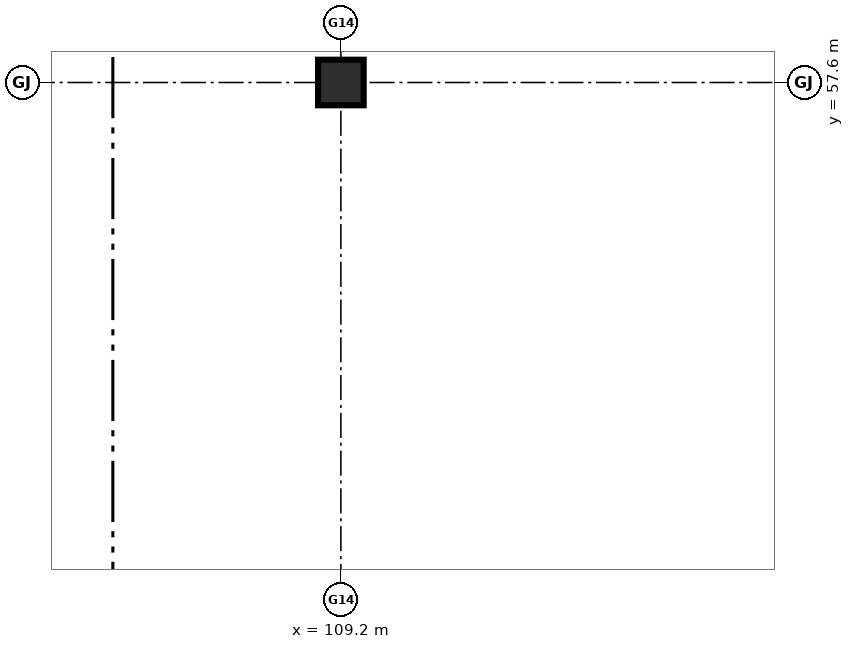
"""IFC4 building model, lengths in metres.
Left out: names, types, materials, properties, quantities, classifications, styles, units other than length and angle.
Written with IfcOpenShell. Run it as: python <this file> out.ifc"""

import sys

from ifc_helpers import new_model, si_unit, direction, frame, origin, origin_2d, place, context, subcontext, project, spatial, rectangle, extrude, element, save


model = new_model("IFC4")
c1 = context("Model", 3, precision=1e-05, world=origin(), true_north=direction((0.0, 1.0)))
c2 = subcontext(c1, "Body", "Model", "MODEL_VIEW")
j1 = project(units=[si_unit("LENGTHUNIT", "METRE"), si_unit("PLANEANGLEUNIT", "RADIAN")], contexts=[c1])
p1 = place(None, origin())
s1 = spatial("IfcSite", under=j1, at=p1, CompositionType="ELEMENT")
p2 = place(p1, origin())
s2 = spatial("IfcBuilding", under=s1, at=p2, CompositionType="ELEMENT")
p3 = place(p2, frame((0.0, 0.0, -4.8)))
s3 = spatial("IfcBuildingStorey", under=s2, at=p3, CompositionType="ELEMENT", Elevation=-4.8)
p4 = place(p3, frame((109.2, 57.6, 0.0), z_axis=(0.0, 0.0, 1.0), x_axis=(1.0, 0.0, 0.0)))
e1 = element("IfcColumn", 1, at=p4, inside=s3, PredefinedType="COLUMN", context=c2, shape_type="SweptSolid", body=[
    extrude(rectangle(XDim=0.6, YDim=0.6, at=origin_2d()), origin(), (0.0, 0.0, 1.0), 4.8),
])
save(model, sys.argv[1])
